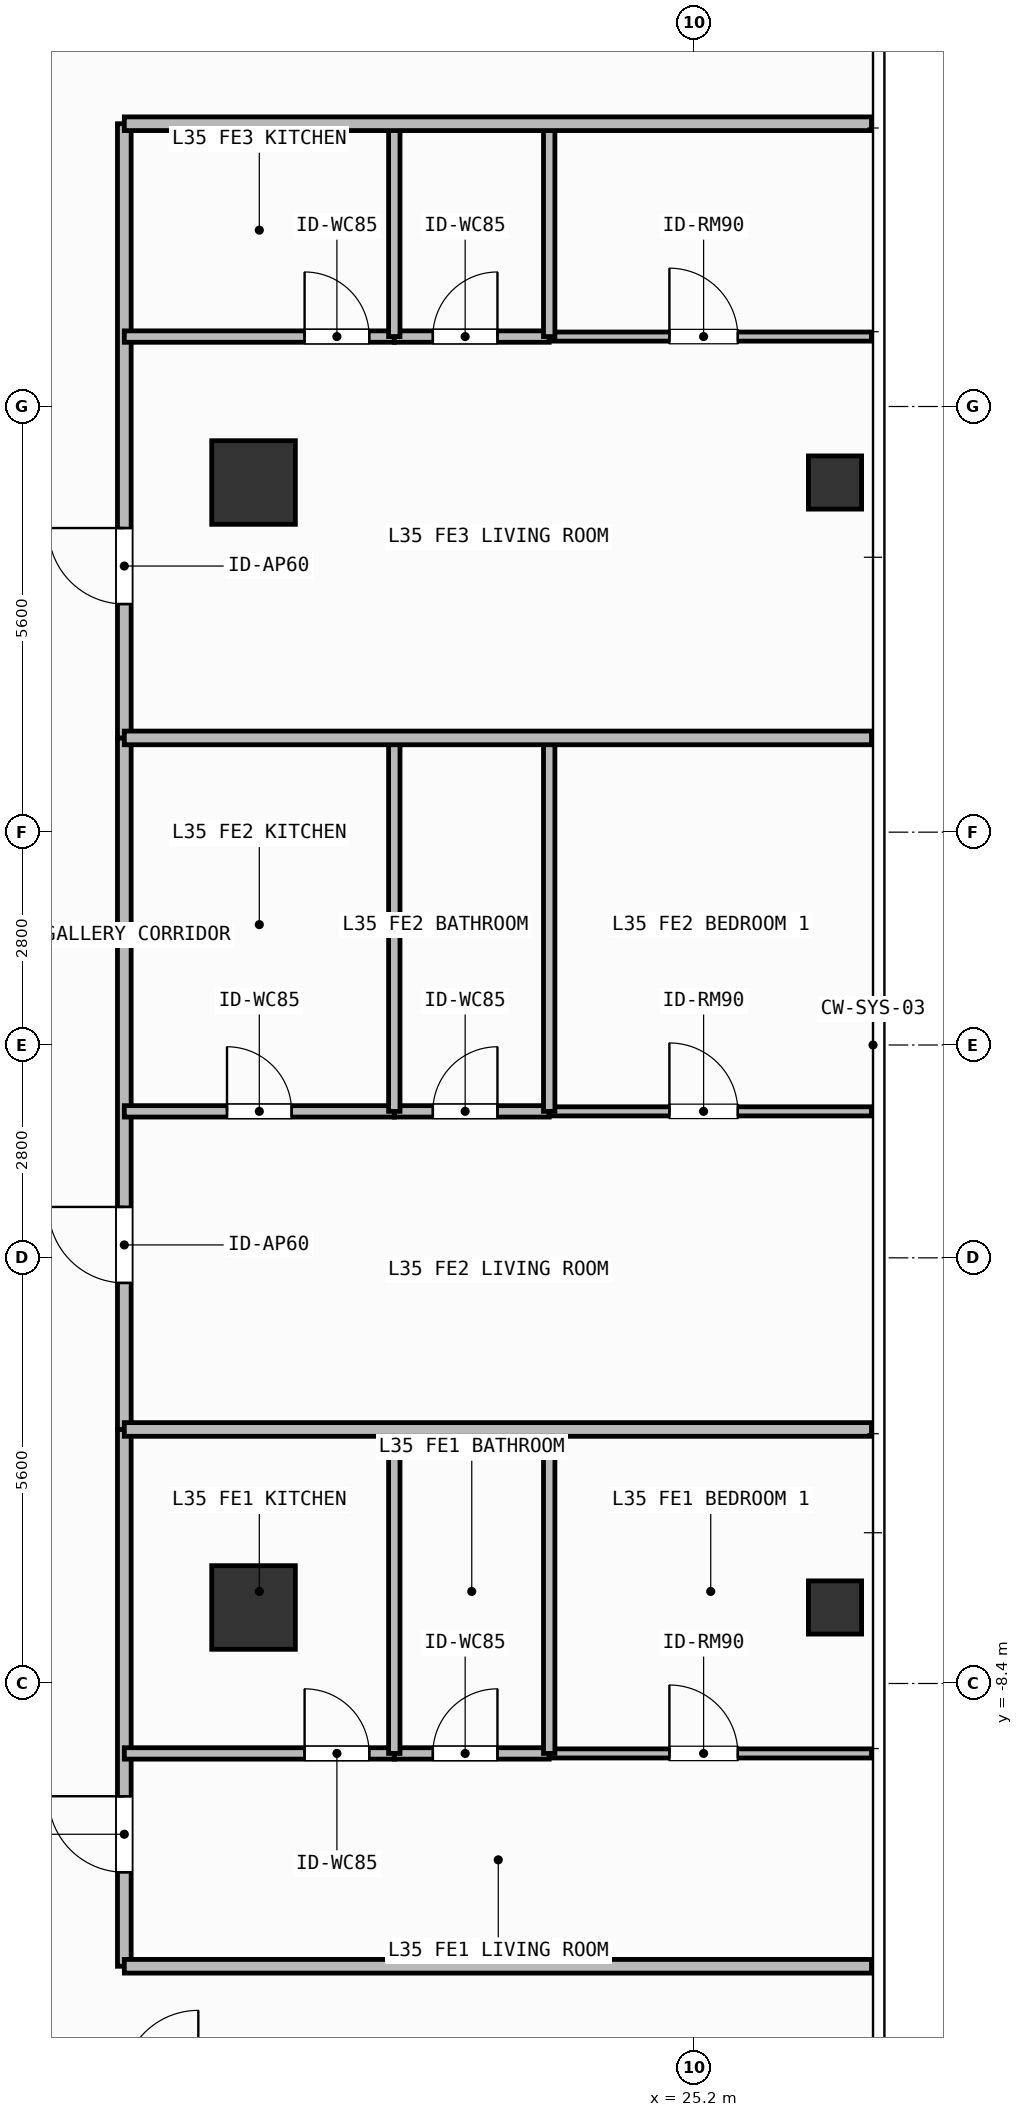
"""IFC4 building model, lengths in metres.
Left out: names, types, materials, properties, quantities, classifications, styles, units other than length and angle.
Written with IfcOpenShell. Run it as: python <this file> out.ifc"""

import sys

from ifc_helpers import new_model, si_unit, direction, frame, frame_2d, origin, origin_2d, place, context, subcontext, project, spatial, rectangle, hollow_rectangle, extrude, element, fill, save


model = new_model("IFC4")
c1 = context("Model", 3, precision=1e-05, world=origin(), true_north=direction((0.0, 1.0)))
c2 = subcontext(c1, "Body", "Model", "MODEL_VIEW")
j1 = project(units=[si_unit("LENGTHUNIT", "METRE"), si_unit("PLANEANGLEUNIT", "RADIAN")], contexts=[c1])
p1 = place(None, origin())
s1 = spatial("IfcSite", under=j1, at=p1, CompositionType="ELEMENT")
p2 = place(p1, origin())
s2 = spatial("IfcBuilding", under=s1, at=p2, CompositionType="ELEMENT")
p3 = place(p2, frame((0.0, 0.0, 140.7)))
s3 = spatial("IfcBuildingStorey", under=s2, at=p3, CompositionType="ELEMENT", Elevation=140.7)
for number, where, z_axis, x_axis in (
    (1, (19.4, -7.4, 0.0), (0.0, 0.0, 1.0), (1.0, 0.0, 0.0)),
    (2, (19.4, 7.4, 0.0), (0.0, 0.0, 1.0), (1.0, 0.0, 0.0)),
):
    element("IfcColumn", number, at=place(p3, frame(where, z_axis=z_axis, x_axis=x_axis)), inside=s3, PredefinedType="COLUMN", context=c2, shape_type="SweptSolid", body=[
        extrude(rectangle(XDim=1.1, YDim=1.1, at=origin_2d()), origin(), (0.0, 0.0, 1.0), 3.9),
    ])
for number, where, z_axis, x_axis in (
    (3, (27.05, -7.4, 0.0), (0.0, 0.0, 1.0), (1.0, 0.0, 0.0)),
    (4, (27.05, 7.4, 0.0), (0.0, 0.0, 1.0), (1.0, 0.0, 0.0)),
):
    element("IfcColumn", number, at=place(p3, frame(where, z_axis=z_axis, x_axis=x_axis)), inside=s3, PredefinedType="COLUMN", context=c2, shape_type="SweptSolid", body=[
        extrude(hollow_rectangle(XDim=0.7, YDim=0.7, WallThickness=0.032, at=origin_2d()), origin(), (0.0, 0.0, 1.0), 3.9),
    ])
p4 = place(p3, frame((17.7, -12.12, 0.0), z_axis=(0.0, 0.0, 1.0), x_axis=(0.0, 1.0, 0.0)))
e5 = element("IfcWall", 5, at=p4, inside=s3, PredefinedType="PARTITIONING", context=c2, shape_type="SweptSolid", body=[
    extrude(rectangle(XDim=7.062, YDim=0.18, at=frame_2d((3.531, 0.0))), origin(), (0.0, 0.0, 1.0), 3.68),
])
p5 = place(p4, frame((1.237, 0.0, 0.0)))
e6 = element("IfcOpeningElement", 6, at=p5, cuts=e5, PredefinedType="OPENING", context=c2, shape_type="SweptSolid", body=[
    extrude(rectangle(XDim=1.0, YDim=2.2, at=frame_2d((0.5, 1.1))), frame((0.0, 0.1, 0.0), z_axis=(0.0, -1.0, 0.0), x_axis=(1.0, 0.0, 0.0)), (0.0, 0.0, 1.0), 0.2),
])
p6 = place(p3, frame((17.7, -9.32, 0.0), z_axis=(0.0, 0.0, 1.0), x_axis=(1.0, 0.0, 0.0)))
e7 = element("IfcWall", 7, at=p6, inside=s3, PredefinedType="PARTITIONING", context=c2, shape_type="SweptSolid", body=[
    extrude(rectangle(XDim=3.552, YDim=0.15, at=frame_2d((1.776, 0.0))), origin(), (0.0, 0.0, 1.0), 3.68),
])
p7 = place(p6, frame((2.372, 0.0, 0.0)))
e8 = element("IfcOpeningElement", 8, at=p7, cuts=e7, PredefinedType="OPENING", context=c2, shape_type="SweptSolid", body=[
    extrude(rectangle(XDim=0.85, YDim=2.1, at=frame_2d((0.425, 1.05))), frame((0.0, 0.085, 0.0), z_axis=(0.0, -1.0, 0.0), x_axis=(1.0, 0.0, 0.0)), (0.0, 0.0, 1.0), 0.17),
])
p8 = place(p3, frame((21.252, -9.32, 0.0), z_axis=(0.0, 0.0, 1.0), x_axis=(1.0, 0.0, 0.0)))
e9 = element("IfcWall", 9, at=p8, inside=s3, PredefinedType="PARTITIONING", context=c2, shape_type="SweptSolid", body=[
    extrude(rectangle(XDim=2.038, YDim=0.15, at=frame_2d((1.019, 0.0))), origin(), (0.0, 0.0, 1.0), 3.68),
])
p9 = place(p8, frame((0.507, 0.0, 0.0)))
e10 = element("IfcOpeningElement", 10, at=p9, cuts=e9, PredefinedType="OPENING", context=c2, shape_type="SweptSolid", body=[
    extrude(rectangle(XDim=0.85, YDim=2.1, at=frame_2d((0.425, 1.05))), frame((0.0, 0.085, 0.0), z_axis=(0.0, -1.0, 0.0), x_axis=(1.0, 0.0, 0.0)), (0.0, 0.0, 1.0), 0.17),
])
p10 = place(p3, frame((23.29, -9.32, 0.0), z_axis=(0.0, 0.0, 1.0), x_axis=(1.0, 0.0, 0.0)))
e11 = element("IfcWall", 11, at=p10, inside=s3, PredefinedType="PARTITIONING", context=c2, shape_type="SweptSolid", body=[
    extrude(rectangle(XDim=4.24, YDim=0.12, at=frame_2d((2.12, 0.0))), origin(), (0.0, 0.0, 1.0), 3.68),
])
p11 = place(p10, frame((1.581, 0.0, 0.0)))
e12 = element("IfcOpeningElement", 12, at=p11, cuts=e11, PredefinedType="OPENING", context=c2, shape_type="SweptSolid", body=[
    extrude(rectangle(XDim=0.9, YDim=2.1, at=frame_2d((0.45, 1.05))), frame((0.0, 0.07, 0.0), z_axis=(0.0, -1.0, 0.0), x_axis=(1.0, 0.0, 0.0)), (0.0, 0.0, 1.0), 0.14),
])
p12 = place(p3, frame((17.7, -5.058, 0.0), z_axis=(0.0, 0.0, 1.0), x_axis=(0.0, 1.0, 0.0)))
e13 = element("IfcWall", 13, at=p12, inside=s3, PredefinedType="PARTITIONING", context=c2, shape_type="SweptSolid", body=[
    extrude(rectangle(XDim=9.098, YDim=0.18, at=frame_2d((4.549, 0.0))), origin(), (0.0, 0.0, 1.0), 3.68),
])
p13 = place(p12, frame((1.928, 0.0, 0.0)))
e14 = element("IfcOpeningElement", 14, at=p13, cuts=e13, PredefinedType="OPENING", context=c2, shape_type="SweptSolid", body=[
    extrude(rectangle(XDim=1.0, YDim=2.2, at=frame_2d((0.5, 1.1))), frame((0.0, 0.1, 0.0), z_axis=(0.0, -1.0, 0.0), x_axis=(1.0, 0.0, 0.0)), (0.0, 0.0, 1.0), 0.2),
])
p14 = place(p3, frame((17.7, -0.873, 0.0), z_axis=(0.0, 0.0, 1.0), x_axis=(1.0, 0.0, 0.0)))
e15 = element("IfcWall", 15, at=p14, inside=s3, PredefinedType="PARTITIONING", context=c2, shape_type="SweptSolid", body=[
    extrude(rectangle(XDim=3.552, YDim=0.15, at=frame_2d((1.776, 0.0))), origin(), (0.0, 0.0, 1.0), 3.68),
])
p15 = place(p14, frame((1.351, 0.0, 0.0)))
e16 = element("IfcOpeningElement", 16, at=p15, cuts=e15, PredefinedType="OPENING", context=c2, shape_type="SweptSolid", body=[
    extrude(rectangle(XDim=0.85, YDim=2.1, at=frame_2d((0.425, 1.05))), frame((0.0, 0.085, 0.0), z_axis=(0.0, -1.0, 0.0), x_axis=(1.0, 0.0, 0.0)), (0.0, 0.0, 1.0), 0.17),
])
p16 = place(p3, frame((21.252, -0.873, 0.0), z_axis=(0.0, 0.0, 1.0), x_axis=(1.0, 0.0, 0.0)))
e17 = element("IfcWall", 17, at=p16, inside=s3, PredefinedType="PARTITIONING", context=c2, shape_type="SweptSolid", body=[
    extrude(rectangle(XDim=2.038, YDim=0.15, at=frame_2d((1.019, 0.0))), origin(), (0.0, 0.0, 1.0), 3.68),
])
p17 = place(p16, frame((0.507, 0.0, 0.0)))
e18 = element("IfcOpeningElement", 18, at=p17, cuts=e17, PredefinedType="OPENING", context=c2, shape_type="SweptSolid", body=[
    extrude(rectangle(XDim=0.85, YDim=2.1, at=frame_2d((0.425, 1.05))), frame((0.0, 0.085, 0.0), z_axis=(0.0, -1.0, 0.0), x_axis=(1.0, 0.0, 0.0)), (0.0, 0.0, 1.0), 0.17),
])
p18 = place(p3, frame((23.29, -0.873, 0.0), z_axis=(0.0, 0.0, 1.0), x_axis=(1.0, 0.0, 0.0)))
e19 = element("IfcWall", 19, at=p18, inside=s3, PredefinedType="PARTITIONING", context=c2, shape_type="SweptSolid", body=[
    extrude(rectangle(XDim=4.24, YDim=0.12, at=frame_2d((2.12, 0.0))), origin(), (0.0, 0.0, 1.0), 3.68),
])
p19 = place(p18, frame((1.581, 0.0, 0.0)))
e20 = element("IfcOpeningElement", 20, at=p19, cuts=e19, PredefinedType="OPENING", context=c2, shape_type="SweptSolid", body=[
    extrude(rectangle(XDim=0.9, YDim=2.1, at=frame_2d((0.45, 1.05))), frame((0.0, 0.07, 0.0), z_axis=(0.0, -1.0, 0.0), x_axis=(1.0, 0.0, 0.0)), (0.0, 0.0, 1.0), 0.14),
])
p20 = place(p3, frame((17.7, 4.04, 0.0), z_axis=(0.0, 0.0, 1.0), x_axis=(0.0, 1.0, 0.0)))
e21 = element("IfcWall", 21, at=p20, inside=s3, PredefinedType="PARTITIONING", context=c2, shape_type="SweptSolid", body=[
    extrude(rectangle(XDim=8.08, YDim=0.18, at=frame_2d((4.04, 0.0))), origin(), (0.0, 0.0, 1.0), 3.68),
])
p21 = place(p20, frame((1.761, 0.0, 0.0)))
e22 = element("IfcOpeningElement", 22, at=p21, cuts=e21, PredefinedType="OPENING", context=c2, shape_type="SweptSolid", body=[
    extrude(rectangle(XDim=1.0, YDim=2.2, at=frame_2d((0.5, 1.1))), frame((0.0, 0.1, 0.0), z_axis=(0.0, -1.0, 0.0), x_axis=(1.0, 0.0, 0.0)), (0.0, 0.0, 1.0), 0.2),
])
p22 = place(p3, frame((17.7, 9.32, 0.0), z_axis=(0.0, 0.0, 1.0), x_axis=(1.0, 0.0, 0.0)))
e23 = element("IfcWall", 23, at=p22, inside=s3, PredefinedType="PARTITIONING", context=c2, shape_type="SweptSolid", body=[
    extrude(rectangle(XDim=3.552, YDim=0.15, at=frame_2d((1.776, 0.0))), origin(), (0.0, 0.0, 1.0), 3.68),
])
p23 = place(p22, frame((2.372, 0.0, 0.0)))
e24 = element("IfcOpeningElement", 24, at=p23, cuts=e23, PredefinedType="OPENING", context=c2, shape_type="SweptSolid", body=[
    extrude(rectangle(XDim=0.85, YDim=2.1, at=frame_2d((0.425, 1.05))), frame((0.0, 0.085, 0.0), z_axis=(0.0, -1.0, 0.0), x_axis=(1.0, 0.0, 0.0)), (0.0, 0.0, 1.0), 0.17),
])
p24 = place(p3, frame((21.252, 9.32, 0.0), z_axis=(0.0, 0.0, 1.0), x_axis=(1.0, 0.0, 0.0)))
e25 = element("IfcWall", 25, at=p24, inside=s3, PredefinedType="PARTITIONING", context=c2, shape_type="SweptSolid", body=[
    extrude(rectangle(XDim=2.038, YDim=0.15, at=frame_2d((1.019, 0.0))), origin(), (0.0, 0.0, 1.0), 3.68),
])
p25 = place(p24, frame((0.507, 0.0, 0.0)))
e26 = element("IfcOpeningElement", 26, at=p25, cuts=e25, PredefinedType="OPENING", context=c2, shape_type="SweptSolid", body=[
    extrude(rectangle(XDim=0.85, YDim=2.1, at=frame_2d((0.425, 1.05))), frame((0.0, 0.085, 0.0), z_axis=(0.0, -1.0, 0.0), x_axis=(1.0, 0.0, 0.0)), (0.0, 0.0, 1.0), 0.17),
])
p26 = place(p3, frame((23.29, 9.32, 0.0), z_axis=(0.0, 0.0, 1.0), x_axis=(1.0, 0.0, 0.0)))
e27 = element("IfcWall", 27, at=p26, inside=s3, PredefinedType="PARTITIONING", context=c2, shape_type="SweptSolid", body=[
    extrude(rectangle(XDim=4.24, YDim=0.12, at=frame_2d((2.12, 0.0))), origin(), (0.0, 0.0, 1.0), 3.68),
])
p27 = place(p26, frame((1.581, 0.0, 0.0)))
e28 = element("IfcOpeningElement", 28, at=p27, cuts=e27, PredefinedType="OPENING", context=c2, shape_type="SweptSolid", body=[
    extrude(rectangle(XDim=0.9, YDim=2.1, at=frame_2d((0.45, 1.05))), frame((0.0, 0.07, 0.0), z_axis=(0.0, -1.0, 0.0), x_axis=(1.0, 0.0, 0.0)), (0.0, 0.0, 1.0), 0.14),
])
for number, where, z_axis, x_axis in (
    (29, (21.252, -9.32, 0.0), (0.0, 0.0, 1.0), (0.0, 1.0, 0.0)),
    (30, (23.29, -9.32, 0.0), (0.0, 0.0, 1.0), (0.0, 1.0, 0.0)),
):
    element("IfcWall", number, at=place(p3, frame(where, z_axis=z_axis, x_axis=x_axis)), inside=s3, PredefinedType="PARTITIONING", context=c2, shape_type="SweptSolid", body=[
        extrude(rectangle(XDim=4.262, YDim=0.15, at=frame_2d((2.131, 0.0))), origin(), (0.0, 0.0, 1.0), 3.68),
    ])
for number, where, z_axis, x_axis in (
    (31, (21.252, -0.873, 0.0), (0.0, 0.0, 1.0), (0.0, 1.0, 0.0)),
    (32, (23.29, -0.873, 0.0), (0.0, 0.0, 1.0), (0.0, 1.0, 0.0)),
):
    element("IfcWall", number, at=place(p3, frame(where, z_axis=z_axis, x_axis=x_axis)), inside=s3, PredefinedType="PARTITIONING", context=c2, shape_type="SweptSolid", body=[
        extrude(rectangle(XDim=4.913, YDim=0.15, at=frame_2d((2.457, 0.0))), origin(), (0.0, 0.0, 1.0), 3.68),
    ])
p28 = place(p3, frame((17.7, -5.058, 0.0), z_axis=(0.0, 0.0, 1.0), x_axis=(1.0, 0.0, 0.0)))
e33 = element("IfcWall", 33, at=p28, inside=s3, PredefinedType="PARTITIONING", context=c2, shape_type="SweptSolid", body=[
    extrude(rectangle(XDim=9.83, YDim=0.18, at=frame_2d((4.915, 0.0))), origin(), (0.0, 0.0, 1.0), 3.68),
])
for number, where, z_axis, x_axis in (
    (34, (21.252, 9.32, 0.0), (0.0, 0.0, 1.0), (0.0, 1.0, 0.0)),
    (35, (23.29, 9.32, 0.0), (0.0, 0.0, 1.0), (0.0, 1.0, 0.0)),
):
    element("IfcWall", number, at=place(p3, frame(where, z_axis=z_axis, x_axis=x_axis)), inside=s3, PredefinedType="PARTITIONING", context=c2, shape_type="SweptSolid", body=[
        extrude(rectangle(XDim=2.8, YDim=0.15, at=frame_2d((1.4, 0.0))), origin(), (0.0, 0.0, 1.0), 3.68),
    ])
for number, where, z_axis, x_axis in (
    (36, (17.7, 4.04, 0.0), (0.0, 0.0, 1.0), (1.0, 0.0, 0.0)),
    (37, (17.7, -12.12, 0.0), (0.0, 0.0, 1.0), (1.0, 0.0, 0.0)),
    (38, (17.7, 12.12, 0.0), (0.0, 0.0, 1.0), (1.0, 0.0, 0.0)),
):
    element("IfcWall", number, at=place(p3, frame(where, z_axis=z_axis, x_axis=x_axis)), inside=s3, PredefinedType="PARTITIONING", context=c2, shape_type="SweptSolid", body=[
        extrude(rectangle(XDim=9.83, YDim=0.18, at=frame_2d((4.915, 0.0))), origin(), (0.0, 0.0, 1.0), 3.68),
    ])
p29 = place(p5, origin())
e39 = element("IfcDoor", 39, at=p29, inside=s3, OperationType="SINGLE_SWING_RIGHT", PredefinedType="DOOR", context=c2, shape_type="SweptSolid", body=[
    extrude(rectangle(XDim=1.0, YDim=2.2, at=frame_2d((0.5, 1.1))), frame((0.0, 0.025, 0.0), z_axis=(0.0, -1.0, 0.0), x_axis=(1.0, 0.0, 0.0)), (0.0, 0.0, 1.0), 0.05),
])
fill(e6, e39)
p30 = place(p7, origin())
e40 = element("IfcDoor", 40, at=p30, inside=s3, OperationType="SINGLE_SWING_LEFT", PredefinedType="DOOR", context=c2, shape_type="SweptSolid", body=[
    extrude(rectangle(XDim=0.85, YDim=2.1, at=frame_2d((0.425, 1.05))), frame((0.0, 0.025, 0.0), z_axis=(0.0, -1.0, 0.0), x_axis=(1.0, 0.0, 0.0)), (0.0, 0.0, 1.0), 0.05),
])
fill(e8, e40)
p31 = place(p9, origin())
e41 = element("IfcDoor", 41, at=p31, inside=s3, OperationType="SINGLE_SWING_RIGHT", PredefinedType="DOOR", context=c2, shape_type="SweptSolid", body=[
    extrude(rectangle(XDim=0.85, YDim=2.1, at=frame_2d((0.425, 1.05))), frame((0.0, 0.025, 0.0), z_axis=(0.0, -1.0, 0.0), x_axis=(1.0, 0.0, 0.0)), (0.0, 0.0, 1.0), 0.05),
])
fill(e10, e41)
p32 = place(p11, origin())
e42 = element("IfcDoor", 42, at=p32, inside=s3, OperationType="SINGLE_SWING_LEFT", PredefinedType="DOOR", context=c2, shape_type="SweptSolid", body=[
    extrude(rectangle(XDim=0.9, YDim=2.1, at=frame_2d((0.45, 1.05))), frame((0.0, 0.025, 0.0), z_axis=(0.0, -1.0, 0.0), x_axis=(1.0, 0.0, 0.0)), (0.0, 0.0, 1.0), 0.05),
])
fill(e12, e42)
p33 = place(p13, origin())
e43 = element("IfcDoor", 43, at=p33, inside=s3, OperationType="SINGLE_SWING_RIGHT", PredefinedType="DOOR", context=c2, shape_type="SweptSolid", body=[
    extrude(rectangle(XDim=1.0, YDim=2.2, at=frame_2d((0.5, 1.1))), frame((0.0, 0.025, 0.0), z_axis=(0.0, -1.0, 0.0), x_axis=(1.0, 0.0, 0.0)), (0.0, 0.0, 1.0), 0.05),
])
fill(e14, e43)
p34 = place(p15, origin())
e44 = element("IfcDoor", 44, at=p34, inside=s3, OperationType="SINGLE_SWING_LEFT", PredefinedType="DOOR", context=c2, shape_type="SweptSolid", body=[
    extrude(rectangle(XDim=0.85, YDim=2.1, at=frame_2d((0.425, 1.05))), frame((0.0, 0.025, 0.0), z_axis=(0.0, -1.0, 0.0), x_axis=(1.0, 0.0, 0.0)), (0.0, 0.0, 1.0), 0.05),
])
fill(e16, e44)
p35 = place(p17, origin())
e45 = element("IfcDoor", 45, at=p35, inside=s3, OperationType="SINGLE_SWING_RIGHT", PredefinedType="DOOR", context=c2, shape_type="SweptSolid", body=[
    extrude(rectangle(XDim=0.85, YDim=2.1, at=frame_2d((0.425, 1.05))), frame((0.0, 0.025, 0.0), z_axis=(0.0, -1.0, 0.0), x_axis=(1.0, 0.0, 0.0)), (0.0, 0.0, 1.0), 0.05),
])
fill(e18, e45)
p36 = place(p19, origin())
e46 = element("IfcDoor", 46, at=p36, inside=s3, OperationType="SINGLE_SWING_LEFT", PredefinedType="DOOR", context=c2, shape_type="SweptSolid", body=[
    extrude(rectangle(XDim=0.9, YDim=2.1, at=frame_2d((0.45, 1.05))), frame((0.0, 0.025, 0.0), z_axis=(0.0, -1.0, 0.0), x_axis=(1.0, 0.0, 0.0)), (0.0, 0.0, 1.0), 0.05),
])
fill(e20, e46)
p37 = place(p21, origin())
e47 = element("IfcDoor", 47, at=p37, inside=s3, OperationType="SINGLE_SWING_RIGHT", PredefinedType="DOOR", context=c2, shape_type="SweptSolid", body=[
    extrude(rectangle(XDim=1.0, YDim=2.2, at=frame_2d((0.5, 1.1))), frame((0.0, 0.025, 0.0), z_axis=(0.0, -1.0, 0.0), x_axis=(1.0, 0.0, 0.0)), (0.0, 0.0, 1.0), 0.05),
])
fill(e22, e47)
p38 = place(p23, origin())
e48 = element("IfcDoor", 48, at=p38, inside=s3, OperationType="SINGLE_SWING_LEFT", PredefinedType="DOOR", context=c2, shape_type="SweptSolid", body=[
    extrude(rectangle(XDim=0.85, YDim=2.1, at=frame_2d((0.425, 1.05))), frame((0.0, 0.025, 0.0), z_axis=(0.0, -1.0, 0.0), x_axis=(1.0, 0.0, 0.0)), (0.0, 0.0, 1.0), 0.05),
])
fill(e24, e48)
p39 = place(p25, origin())
e49 = element("IfcDoor", 49, at=p39, inside=s3, OperationType="SINGLE_SWING_RIGHT", PredefinedType="DOOR", context=c2, shape_type="SweptSolid", body=[
    extrude(rectangle(XDim=0.85, YDim=2.1, at=frame_2d((0.425, 1.05))), frame((0.0, 0.025, 0.0), z_axis=(0.0, -1.0, 0.0), x_axis=(1.0, 0.0, 0.0)), (0.0, 0.0, 1.0), 0.05),
])
fill(e26, e49)
p40 = place(p27, origin())
e50 = element("IfcDoor", 50, at=p40, inside=s3, OperationType="SINGLE_SWING_LEFT", PredefinedType="DOOR", context=c2, shape_type="SweptSolid", body=[
    extrude(rectangle(XDim=0.9, YDim=2.1, at=frame_2d((0.45, 1.05))), frame((0.0, 0.025, 0.0), z_axis=(0.0, -1.0, 0.0), x_axis=(1.0, 0.0, 0.0)), (0.0, 0.0, 1.0), 0.05),
])
fill(e28, e50)
save(model, sys.argv[1])
